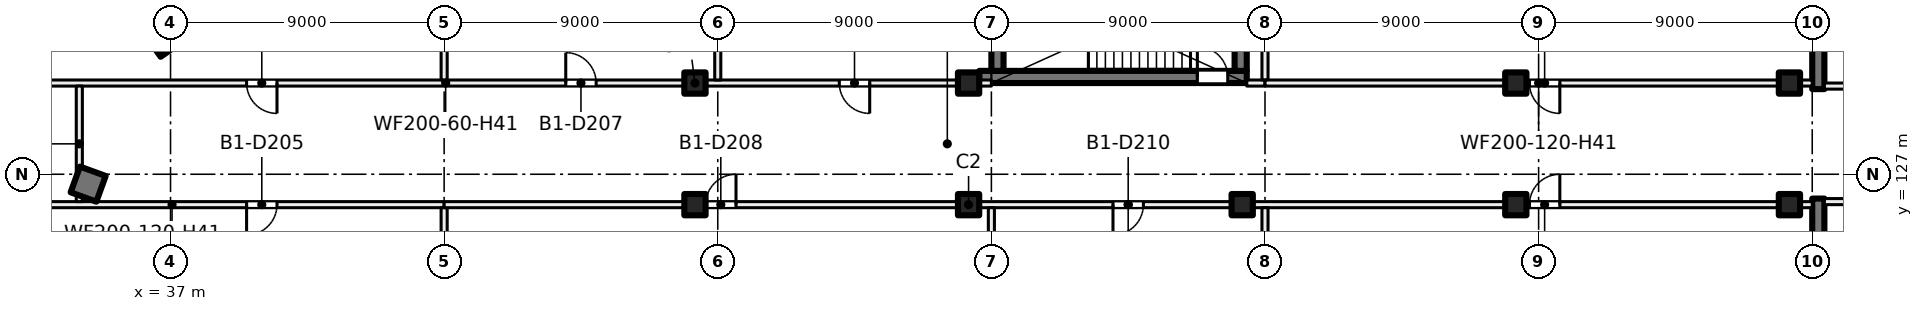
"""IFC4 building model, lengths in metres.
Left out: names, types, materials, properties, quantities, classifications, styles, units other than length and angle.
Written with IfcOpenShell. Run it as: python <this file> out.ifc"""

import sys

from ifc_helpers import new_model, si_unit, direction, frame, frame_2d, origin, origin_2d, place, context, subcontext, project, spatial, rectangle, hollow_rectangle, extrude, element, fill, save


model = new_model("IFC4")
c1 = context("Model", 3, precision=1e-05, world=origin(), true_north=direction((0.0, 1.0)))
c2 = subcontext(c1, "Body", "Model", "MODEL_VIEW")
j1 = project(units=[si_unit("LENGTHUNIT", "METRE"), si_unit("PLANEANGLEUNIT", "RADIAN")], contexts=[c1])
p1 = place(None, origin())
s1 = spatial("IfcSite", under=j1, at=p1, CompositionType="ELEMENT")
p2 = place(p1, origin())
s2 = spatial("IfcBuilding", under=s1, at=p2, CompositionType="ELEMENT")
p3 = place(p2, frame((0.0, 0.0, -4.5)))
s3 = spatial("IfcBuildingStorey", under=s2, at=p3, CompositionType="ELEMENT", Elevation=-4.5)
p4 = place(p3, frame((36.846, 131.838, 0.0), z_axis=(0.0, 0.0, 1.0), x_axis=(0.573576436351, -0.819152044289, 0.0)))
e1 = element("IfcColumn", 1, at=p4, inside=s3, PredefinedType="COLUMN", context=c2, shape_type="SweptSolid", body=[
    extrude(hollow_rectangle(XDim=1.4, YDim=1.4, WallThickness=0.04, at=origin_2d()), origin(), (0.0, 0.0, 1.0), 4.5),
])
for number, where, z_axis, x_axis in (
    (2, (54.25, 130.0, 0.0), (0.0, 0.0, 1.0), (1.0, 0.0, 0.0)),
    (3, (63.25, 130.0, 0.0), (0.0, 0.0, 1.0), (1.0, 0.0, 0.0)),
    (4, (81.25, 130.0, 0.0), (0.0, 0.0, 1.0), (1.0, 0.0, 0.0)),
    (5, (90.25, 130.0, 0.0), (0.0, 0.0, 1.0), (1.0, 0.0, 0.0)),
    (6, (54.25, 126.0, 0.0), (0.0, 0.0, 1.0), (1.0, 0.0, 0.0)),
    (7, (63.25, 126.0, 0.0), (0.0, 0.0, 1.0), (1.0, 0.0, 0.0)),
    (8, (72.25, 126.0, 0.0), (0.0, 0.0, 1.0), (1.0, 0.0, 0.0)),
    (9, (81.25, 126.0, 0.0), (0.0, 0.0, 1.0), (1.0, 0.0, 0.0)),
    (10, (90.25, 126.0, 0.0), (0.0, 0.0, 1.0), (1.0, 0.0, 0.0)),
):
    element("IfcColumn", number, at=place(p3, frame(where, z_axis=z_axis, x_axis=x_axis)), inside=s3, PredefinedType="COLUMN", context=c2, shape_type="SweptSolid", body=[
        extrude(rectangle(XDim=0.7, YDim=0.7, at=origin_2d()), origin(), (0.0, 0.0, 1.0), 4.5),
    ])
p5 = place(p3, frame((34.291, 126.675, 0.0), z_axis=(0.0, 0.0, 1.0), x_axis=(-0.342020143326, -0.939692620786, 0.0)))
e11 = element("IfcColumn", 11, at=p5, inside=s3, PredefinedType="COLUMN", context=c2, shape_type="SweptSolid", body=[
    extrude(rectangle(XDim=0.9, YDim=0.9, at=origin_2d()), origin(), (0.0, 0.0, 1.0), 4.5),
])
for number, where, z_axis, x_axis in (
    (12, (91.2, 138.4, 0.0), (0.0, 0.0, 1.0), (0.0, -1.0, 0.0)),
    (13, (91.2, 126.2, 0.0), (0.0, 0.0, 1.0), (0.0, -1.0, 0.0)),
):
    element("IfcWall", number, at=place(p3, frame(where, z_axis=z_axis, x_axis=x_axis)), inside=s3, PredefinedType="SHEAR", context=c2, shape_type="SweptSolid", body=[
        extrude(rectangle(XDim=8.6, YDim=0.4, at=frame_2d((4.3, 0.0))), origin(), (0.0, 0.0, 1.0), 4.5),
    ])
p6 = place(p3, frame((63.6, 130.2, 0.0), z_axis=(0.0, 0.0, 1.0), x_axis=(1.0, 0.0, 0.0)))
e14 = element("IfcWall", 14, at=p6, inside=s3, PredefinedType="SHEAR", context=c2, shape_type="SweptSolid", body=[
    extrude(rectangle(XDim=8.8, YDim=0.4, at=frame_2d((4.4, 0.0))), origin(), (0.0, 0.0, 1.0), 4.5),
])
p7 = place(p6, frame((7.175, 0.0, 0.0)))
e15 = element("IfcOpeningElement", 15, at=p7, cuts=e14, PredefinedType="OPENING", context=c2, shape_type="SweptSolid", body=[
    extrude(rectangle(XDim=1.0, YDim=2.1, at=frame_2d((0.5, 1.05))), frame((0.0, 0.21, 0.0), z_axis=(0.0, -1.0, 0.0), x_axis=(1.0, 0.0, 0.0)), (0.0, 0.0, 1.0), 0.42),
])
for number, where, z_axis, x_axis in (
    (16, (64.2, 130.4, 0.0), (0.0, 0.0, 1.0), (0.0, 1.0, 0.0)),
    (17, (72.2, 130.4, 0.0), (0.0, 0.0, 1.0), (0.0, 1.0, 0.0)),
):
    element("IfcWall", number, at=place(p3, frame(where, z_axis=z_axis, x_axis=x_axis)), inside=s3, PredefinedType="SHEAR", context=c2, shape_type="SweptSolid", body=[
        extrude(rectangle(XDim=3.0, YDim=0.4, at=frame_2d((1.5, 0.0))), origin(), (0.0, 0.0, 1.0), 4.5),
    ])
p8 = place(p3, frame((95.2, 126.1, 0.0), z_axis=(0.0, 0.0, 1.0), x_axis=(-1.0, 0.0, 0.0)))
e18 = element("IfcWall", 18, at=p8, inside=s3, PredefinedType="PARTITIONING", context=c2, shape_type="SweptSolid", body=[
    extrude(rectangle(XDim=3.8, YDim=0.2, at=frame_2d((1.9, 0.0))), origin(), (0.0, 0.0, 1.0), 4.1),
])
p9 = place(p8, frame((0.3, 0.0, 0.0)))
e19 = element("IfcOpeningElement", 19, at=p9, cuts=e18, PredefinedType="OPENING", context=c2, shape_type="SweptSolid", body=[
    extrude(rectangle(XDim=1.2, YDim=2.1, at=frame_2d((0.6, 1.05))), frame((0.0, 0.11, 0.0), z_axis=(0.0, -1.0, 0.0), x_axis=(1.0, 0.0, 0.0)), (0.0, 0.0, 1.0), 0.22),
])
p10 = place(p3, frame((91.4, 129.9, 0.0), z_axis=(0.0, 0.0, 1.0), x_axis=(1.0, 0.0, 0.0)))
e20 = element("IfcWall", 20, at=p10, inside=s3, PredefinedType="PARTITIONING", context=c2, shape_type="SweptSolid", body=[
    extrude(rectangle(XDim=3.8, YDim=0.2, at=frame_2d((1.9, 0.0))), origin(), (0.0, 0.0, 1.0), 4.1),
])
p11 = place(p10, frame((2.3, 0.0, 0.0)))
e21 = element("IfcOpeningElement", 21, at=p11, cuts=e20, PredefinedType="OPENING", context=c2, shape_type="SweptSolid", body=[
    extrude(rectangle(XDim=1.2, YDim=2.1, at=frame_2d((0.6, 1.05))), frame((0.0, 0.11, 0.0), z_axis=(0.0, -1.0, 0.0), x_axis=(1.0, 0.0, 0.0)), (0.0, 0.0, 1.0), 0.22),
])
p12 = place(p3, frame((46.0, 126.0, 0.0), z_axis=(0.0, 0.0, 1.0), x_axis=(-1.0, 0.0, 0.0)))
e22 = element("IfcWall", 22, at=p12, inside=s3, PredefinedType="PARTITIONING", context=c2, shape_type="SweptSolid", body=[
    extrude(rectangle(XDim=17.9, YDim=0.2, at=frame_2d((8.95, 0.0))), origin(), (0.0, 0.0, 1.0), 4.1),
])
p13 = place(p12, frame((5.498, 0.0, 0.0)))
e23 = element("IfcOpeningElement", 23, at=p13, cuts=e22, PredefinedType="OPENING", context=c2, shape_type="SweptSolid", body=[
    extrude(rectangle(XDim=1.0, YDim=2.1, at=frame_2d((0.5, 1.05))), frame((0.0, 0.11, 0.0), z_axis=(0.0, -1.0, 0.0), x_axis=(1.0, 0.0, 0.0)), (0.0, 0.0, 1.0), 0.22),
])
p14 = place(p3, frame((28.1, 130.0, 0.0), z_axis=(0.0, 0.0, 1.0), x_axis=(1.0, 0.0, 0.0)))
e24 = element("IfcWall", 24, at=p14, inside=s3, PredefinedType="PARTITIONING", context=c2, shape_type="SweptSolid", body=[
    extrude(rectangle(XDim=35.9, YDim=0.2, at=frame_2d((17.95, 0.0))), origin(), (0.0, 0.0, 1.0), 4.1),
])
p15 = place(p14, frame((11.402, 0.0, 0.0)))
e25 = element("IfcOpeningElement", 25, at=p15, cuts=e24, PredefinedType="OPENING", context=c2, shape_type="SweptSolid", body=[
    extrude(rectangle(XDim=1.0, YDim=2.1, at=frame_2d((0.5, 1.05))), frame((0.0, 0.11, 0.0), z_axis=(0.0, -1.0, 0.0), x_axis=(1.0, 0.0, 0.0)), (0.0, 0.0, 1.0), 0.22),
])
p16 = place(p14, frame((21.9, 0.0, 0.0)))
e26 = element("IfcOpeningElement", 26, at=p16, cuts=e24, PredefinedType="OPENING", context=c2, shape_type="SweptSolid", body=[
    extrude(rectangle(XDim=1.0, YDim=2.1, at=frame_2d((0.5, 1.05))), frame((0.0, 0.11, 0.0), z_axis=(0.0, -1.0, 0.0), x_axis=(1.0, 0.0, 0.0)), (0.0, 0.0, 1.0), 0.22),
])
p17 = place(p14, frame((30.898, 0.0, 0.0)))
e27 = element("IfcOpeningElement", 27, at=p17, cuts=e24, PredefinedType="OPENING", context=c2, shape_type="SweptSolid", body=[
    extrude(rectangle(XDim=1.0, YDim=2.1, at=frame_2d((0.5, 1.05))), frame((0.0, 0.11, 0.0), z_axis=(0.0, -1.0, 0.0), x_axis=(1.0, 0.0, 0.0)), (0.0, 0.0, 1.0), 0.22),
])
p18 = place(p3, frame((34.0, 126.1, 0.0), z_axis=(0.0, 0.0, 1.0), x_axis=(0.0, 1.0, 0.0)))
e28 = element("IfcWall", 28, at=p18, inside=s3, PredefinedType="PARTITIONING", context=c2, shape_type="SweptSolid", body=[
    extrude(rectangle(XDim=3.8, YDim=0.2, at=frame_2d((1.9, 0.0))), origin(), (0.0, 0.0, 1.0), 4.1),
])
p19 = place(p3, frame((46.0, 109.1, 0.0), z_axis=(0.0, 0.0, 1.0), x_axis=(0.0, 1.0, 0.0)))
e29 = element("IfcWall", 29, at=p19, inside=s3, PredefinedType="PARTITIONING", context=c2, shape_type="SweptSolid", body=[
    extrude(rectangle(XDim=16.8, YDim=0.2, at=frame_2d((8.4, 0.0))), origin(), (0.0, 0.0, 1.0), 4.1),
])
p20 = place(p3, frame((91.0, 126.0, 0.0), z_axis=(0.0, 0.0, 1.0), x_axis=(-1.0, 0.0, 0.0)))
e30 = element("IfcWall", 30, at=p20, inside=s3, PredefinedType="PARTITIONING", context=c2, shape_type="SweptSolid", body=[
    extrude(rectangle(XDim=45.0, YDim=0.2, at=frame_2d((22.5, 0.0))), origin(), (0.0, 0.0, 1.0), 4.1),
])
p21 = place(p20, frame((35.4, 0.0, 0.0)))
e31 = element("IfcOpeningElement", 31, at=p21, cuts=e30, PredefinedType="OPENING", context=c2, shape_type="SweptSolid", body=[
    extrude(rectangle(XDim=1.0, YDim=2.1, at=frame_2d((0.5, 1.05))), frame((0.0, 0.11, 0.0), z_axis=(0.0, -1.0, 0.0), x_axis=(1.0, 0.0, 0.0)), (0.0, 0.0, 1.0), 0.22),
])
p22 = place(p20, frame((22.0, 0.0, 0.0)))
e32 = element("IfcOpeningElement", 32, at=p22, cuts=e30, PredefinedType="OPENING", context=c2, shape_type="SweptSolid", body=[
    extrude(rectangle(XDim=1.0, YDim=2.1, at=frame_2d((0.5, 1.05))), frame((0.0, 0.11, 0.0), z_axis=(0.0, -1.0, 0.0), x_axis=(1.0, 0.0, 0.0)), (0.0, 0.0, 1.0), 0.22),
])
p23 = place(p20, frame((8.302, 0.0, 0.0)))
e33 = element("IfcOpeningElement", 33, at=p23, cuts=e30, PredefinedType="OPENING", context=c2, shape_type="SweptSolid", body=[
    extrude(rectangle(XDim=1.0, YDim=2.1, at=frame_2d((0.5, 1.05))), frame((0.0, 0.11, 0.0), z_axis=(0.0, -1.0, 0.0), x_axis=(1.0, 0.0, 0.0)), (0.0, 0.0, 1.0), 0.22),
])
p24 = place(p3, frame((46.0, 130.1, 0.0), z_axis=(0.0, 0.0, 1.0), x_axis=(0.0, 1.0, 0.0)))
e34 = element("IfcWall", 34, at=p24, inside=s3, PredefinedType="PARTITIONING", context=c2, shape_type="SweptSolid", body=[
    extrude(rectangle(XDim=16.24, YDim=0.2, at=frame_2d((8.12, 0.0))), origin(), (0.0, 0.0, 1.0), 4.1),
])
p25 = place(p3, frame((55.0, 130.1, 0.0), z_axis=(0.0, 0.0, 1.0), x_axis=(0.0, 1.0, 0.0)))
e35 = element("IfcWall", 35, at=p25, inside=s3, PredefinedType="PARTITIONING", context=c2, shape_type="SweptSolid", body=[
    extrude(rectangle(XDim=16.25, YDim=0.2, at=frame_2d((8.125, 0.0))), origin(), (0.0, 0.0, 1.0), 4.1),
])
p26 = place(p3, frame((64.0, 109.1, 0.0), z_axis=(0.0, 0.0, 1.0), x_axis=(0.0, 1.0, 0.0)))
e36 = element("IfcWall", 36, at=p26, inside=s3, PredefinedType="PARTITIONING", context=c2, shape_type="SweptSolid", body=[
    extrude(rectangle(XDim=16.8, YDim=0.2, at=frame_2d((8.4, 0.0))), origin(), (0.0, 0.0, 1.0), 4.1),
])
p27 = place(p3, frame((72.4, 130.0, 0.0), z_axis=(0.0, 0.0, 1.0), x_axis=(1.0, 0.0, 0.0)))
e37 = element("IfcWall", 37, at=p27, inside=s3, PredefinedType="PARTITIONING", context=c2, shape_type="SweptSolid", body=[
    extrude(rectangle(XDim=0.6, YDim=0.2, at=frame_2d((0.3, 0.0))), origin(), (0.0, 0.0, 1.0), 4.1),
])
p28 = place(p3, frame((73.0, 109.1, 0.0), z_axis=(0.0, 0.0, 1.0), x_axis=(0.0, 1.0, 0.0)))
e38 = element("IfcWall", 38, at=p28, inside=s3, PredefinedType="PARTITIONING", context=c2, shape_type="SweptSolid", body=[
    extrude(rectangle(XDim=16.8, YDim=0.2, at=frame_2d((8.4, 0.0))), origin(), (0.0, 0.0, 1.0), 4.1),
])
p29 = place(p3, frame((73.0, 130.1, 0.0), z_axis=(0.0, 0.0, 1.0), x_axis=(0.0, 1.0, 0.0)))
e39 = element("IfcWall", 39, at=p29, inside=s3, PredefinedType="PARTITIONING", context=c2, shape_type="SweptSolid", body=[
    extrude(rectangle(XDim=16.25, YDim=0.2, at=frame_2d((8.125, 0.0))), origin(), (0.0, 0.0, 1.0), 4.1),
])
p30 = place(p3, frame((73.0, 130.0, 0.0), z_axis=(0.0, 0.0, 1.0), x_axis=(1.0, 0.0, 0.0)))
e40 = element("IfcWall", 40, at=p30, inside=s3, PredefinedType="PARTITIONING", context=c2, shape_type="SweptSolid", body=[
    extrude(rectangle(XDim=18.0, YDim=0.2, at=frame_2d((9.0, 0.0))), origin(), (0.0, 0.0, 1.0), 4.1),
])
p31 = place(p30, frame((8.698, 0.0, 0.0)))
e41 = element("IfcOpeningElement", 41, at=p31, cuts=e40, PredefinedType="OPENING", context=c2, shape_type="SweptSolid", body=[
    extrude(rectangle(XDim=1.0, YDim=2.1, at=frame_2d((0.5, 1.05))), frame((0.0, 0.11, 0.0), z_axis=(0.0, -1.0, 0.0), x_axis=(1.0, 0.0, 0.0)), (0.0, 0.0, 1.0), 0.22),
])
p32 = place(p7, origin())
e42 = element("IfcDoor", 42, at=p32, inside=s3, OperationType="SINGLE_SWING_LEFT", PredefinedType="DOOR", context=c2, shape_type="SweptSolid", body=[
    extrude(rectangle(XDim=1.0, YDim=2.1, at=frame_2d((0.5, 1.05))), frame((0.0, 0.025, 0.0), z_axis=(0.0, -1.0, 0.0), x_axis=(1.0, 0.0, 0.0)), (0.0, 0.0, 1.0), 0.05),
])
fill(e15, e42)
p33 = place(p13, origin())
e43 = element("IfcDoor", 43, at=p33, inside=s3, OperationType="SINGLE_SWING_RIGHT", PredefinedType="DOOR", context=c2, shape_type="SweptSolid", body=[
    extrude(rectangle(XDim=1.0, YDim=2.1, at=frame_2d((0.5, 1.05))), frame((0.0, 0.025, 0.0), z_axis=(0.0, -1.0, 0.0), x_axis=(1.0, 0.0, 0.0)), (0.0, 0.0, 1.0), 0.05),
])
fill(e23, e43)
p34 = place(p15, origin())
e44 = element("IfcDoor", 44, at=p34, inside=s3, OperationType="SINGLE_SWING_RIGHT", PredefinedType="DOOR", context=c2, shape_type="SweptSolid", body=[
    extrude(rectangle(XDim=1.0, YDim=2.1, at=frame_2d((0.5, 1.05))), frame((0.0, 0.025, 0.0), z_axis=(0.0, -1.0, 0.0), x_axis=(1.0, 0.0, 0.0)), (0.0, 0.0, 1.0), 0.05),
])
fill(e25, e44)
p35 = place(p16, origin())
e45 = element("IfcDoor", 45, at=p35, inside=s3, OperationType="SINGLE_SWING_LEFT", PredefinedType="DOOR", context=c2, shape_type="SweptSolid", body=[
    extrude(rectangle(XDim=1.0, YDim=2.1, at=frame_2d((0.5, 1.05))), frame((0.0, 0.025, 0.0), z_axis=(0.0, -1.0, 0.0), x_axis=(1.0, 0.0, 0.0)), (0.0, 0.0, 1.0), 0.05),
])
fill(e26, e45)
p36 = place(p21, origin())
e46 = element("IfcDoor", 46, at=p36, inside=s3, OperationType="SINGLE_SWING_LEFT", PredefinedType="DOOR", context=c2, shape_type="SweptSolid", body=[
    extrude(rectangle(XDim=1.0, YDim=2.1, at=frame_2d((0.5, 1.05))), frame((0.0, 0.025, 0.0), z_axis=(0.0, -1.0, 0.0), x_axis=(1.0, 0.0, 0.0)), (0.0, 0.0, 1.0), 0.05),
])
fill(e31, e46)
p37 = place(p17, origin())
e47 = element("IfcDoor", 47, at=p37, inside=s3, OperationType="SINGLE_SWING_RIGHT", PredefinedType="DOOR", context=c2, shape_type="SweptSolid", body=[
    extrude(rectangle(XDim=1.0, YDim=2.1, at=frame_2d((0.5, 1.05))), frame((0.0, 0.025, 0.0), z_axis=(0.0, -1.0, 0.0), x_axis=(1.0, 0.0, 0.0)), (0.0, 0.0, 1.0), 0.05),
])
fill(e27, e47)
p38 = place(p22, origin())
e48 = element("IfcDoor", 48, at=p38, inside=s3, OperationType="SINGLE_SWING_RIGHT", PredefinedType="DOOR", context=c2, shape_type="SweptSolid", body=[
    extrude(rectangle(XDim=1.0, YDim=2.1, at=frame_2d((0.5, 1.05))), frame((0.0, 0.025, 0.0), z_axis=(0.0, -1.0, 0.0), x_axis=(1.0, 0.0, 0.0)), (0.0, 0.0, 1.0), 0.05),
])
fill(e32, e48)
p39 = place(p23, origin())
e49 = element("IfcDoor", 49, at=p39, inside=s3, OperationType="SINGLE_SWING_LEFT", PredefinedType="DOOR", context=c2, shape_type="SweptSolid", body=[
    extrude(rectangle(XDim=1.0, YDim=2.1, at=frame_2d((0.5, 1.05))), frame((0.0, 0.025, 0.0), z_axis=(0.0, -1.0, 0.0), x_axis=(1.0, 0.0, 0.0)), (0.0, 0.0, 1.0), 0.05),
])
fill(e33, e49)
p40 = place(p31, origin())
e50 = element("IfcDoor", 50, at=p40, inside=s3, OperationType="SINGLE_SWING_RIGHT", PredefinedType="DOOR", context=c2, shape_type="SweptSolid", body=[
    extrude(rectangle(XDim=1.0, YDim=2.1, at=frame_2d((0.5, 1.05))), frame((0.0, 0.025, 0.0), z_axis=(0.0, -1.0, 0.0), x_axis=(1.0, 0.0, 0.0)), (0.0, 0.0, 1.0), 0.05),
])
fill(e41, e50)
save(model, sys.argv[1])
